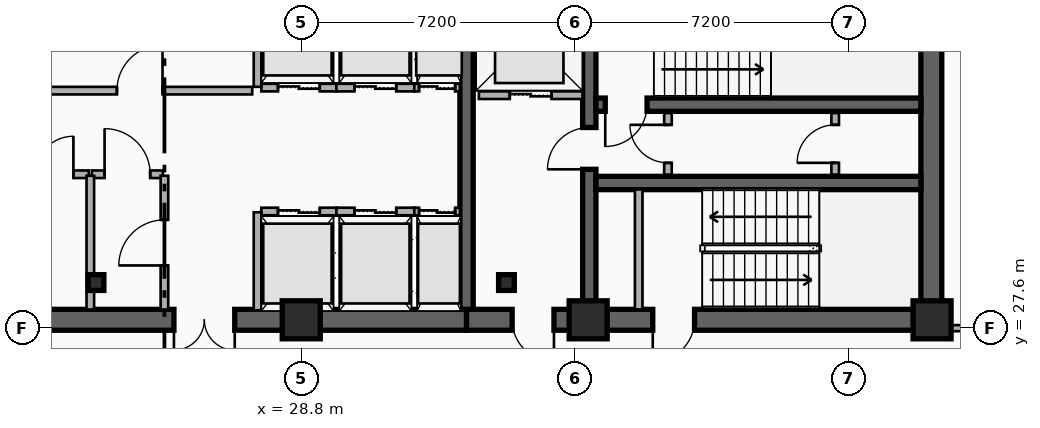
"""IFC4 building model, lengths in metres.
Left out: names, types, materials, properties, quantities, classifications, styles, units other than length and angle.
Written with IfcOpenShell. Run it as: python <this file> out.ifc"""

import sys

from ifc_helpers import new_model, si_unit, direction, frame, frame_2d, origin, origin_2d, place, context, subcontext, project, spatial, rectangle, i_section, extrude, element, fill, save


model = new_model("IFC4")
c1 = context("Model", 3, precision=1e-05, world=origin(), true_north=direction((0.0, 1.0)))
c2 = subcontext(c1, "Body", "Model", "MODEL_VIEW")
j1 = project(units=[si_unit("LENGTHUNIT", "METRE"), si_unit("PLANEANGLEUNIT", "RADIAN")], contexts=[c1])
p1 = place(None, origin())
s1 = spatial("IfcSite", under=j1, at=p1, CompositionType="ELEMENT")
p2 = place(p1, origin())
s2 = spatial("IfcBuilding", under=s1, at=p2, CompositionType="ELEMENT")
p3 = place(p2, frame((0.0, 0.0, 183.85)))
s3 = spatial("IfcBuildingStorey", under=s2, at=p3, CompositionType="ELEMENT", Elevation=183.85)
p4 = place(p3, frame((33.15, 27.82, 0.0), z_axis=(0.0, 0.0, 1.0), x_axis=(-1.0, 0.0, 0.0)))
e1 = element("IfcWall", 1, at=p4, inside=s3, PredefinedType="SHEAR", context=c2, shape_type="SweptSolid", body=[
    extrude(rectangle(XDim=11.97, YDim=0.55, at=frame_2d((5.985, 0.0))), origin(), (0.0, 0.0, 1.0), 4.55),
])
p5 = place(p4, frame((6.1, 0.0, 0.0)))
e2 = element("IfcOpeningElement", 2, at=p5, cuts=e1, PredefinedType="OPENING", context=c2, shape_type="SweptSolid", body=[
    extrude(rectangle(XDim=1.6, YDim=2.2, at=frame_2d((0.8, 1.1))), frame((0.0, 0.285, 0.0), z_axis=(0.0, -1.0, 0.0), x_axis=(1.0, 0.0, 0.0)), (0.0, 0.0, 1.0), 0.57),
])
p6 = place(p3, frame((45.38, 27.82, 0.0), z_axis=(0.0, 0.0, 1.0), x_axis=(-1.0, 0.0, 0.0)))
e3 = element("IfcWall", 3, at=p6, inside=s3, PredefinedType="SHEAR", context=c2, shape_type="SweptSolid", body=[
    extrude(rectangle(XDim=12.23, YDim=0.55, at=frame_2d((6.115, 0.0))), origin(), (0.0, 0.0, 1.0), 4.55),
])
p7 = place(p6, frame((9.93, 0.0, 0.0)))
e4 = element("IfcOpeningElement", 4, at=p7, cuts=e3, PredefinedType="OPENING", context=c2, shape_type="SweptSolid", body=[
    extrude(rectangle(XDim=1.1, YDim=2.15, at=frame_2d((0.55, 1.075))), frame((0.0, 0.285, 0.0), z_axis=(0.0, -1.0, 0.0), x_axis=(1.0, 0.0, 0.0)), (0.0, 0.0, 1.0), 0.57),
])
p8 = place(p6, frame((6.23, 0.0, 0.0)))
e5 = element("IfcOpeningElement", 5, at=p8, cuts=e3, PredefinedType="OPENING", context=c2, shape_type="SweptSolid", body=[
    extrude(rectangle(XDim=1.1, YDim=2.15, at=frame_2d((0.55, 1.075))), frame((0.0, 0.285, 0.0), z_axis=(0.0, -1.0, 0.0), x_axis=(1.0, 0.0, 0.0)), (0.0, 0.0, 1.0), 0.57),
])
p9 = place(p3, frame((45.38, 28.095, 0.0), z_axis=(0.0, 0.0, 1.0), x_axis=(0.0, 1.0, 0.0)))
e6 = element("IfcWall", 6, at=p9, inside=s3, PredefinedType="SHEAR", context=c2, shape_type="SweptSolid", body=[
    extrude(rectangle(XDim=8.68, YDim=0.55, at=frame_2d((4.34, 0.0))), origin(), (0.0, 0.0, 1.0), 4.55),
])
p10 = place(p3, frame((33.15, 28.095, 0.0), z_axis=(0.0, 0.0, 1.0), x_axis=(0.0, 1.0, 0.0)))
e7 = element("IfcWall", 7, at=p10, inside=s3, PredefinedType="SHEAR", context=c2, shape_type="SweptSolid", body=[
    extrude(rectangle(XDim=8.68, YDim=0.35, at=frame_2d((4.34, 0.0))), origin(), (0.0, 0.0, 1.0), 4.55),
])
p11 = place(p3, frame((36.38, 28.095, 0.0), z_axis=(0.0, 0.0, 1.0), x_axis=(0.0, 1.0, 0.0)))
e8 = element("IfcWall", 8, at=p11, inside=s3, PredefinedType="SHEAR", context=c2, shape_type="SweptSolid", body=[
    extrude(rectangle(XDim=8.68, YDim=0.35, at=frame_2d((4.34, 0.0))), origin(), (0.0, 0.0, 1.0), 4.55),
])
p12 = place(p11, frame((3.685, 0.0, 0.0)))
e9 = element("IfcOpeningElement", 9, at=p12, cuts=e8, PredefinedType="OPENING", context=c2, shape_type="SweptSolid", body=[
    extrude(rectangle(XDim=1.1, YDim=2.15, at=frame_2d((0.55, 1.075))), frame((0.0, 0.185, 0.0), z_axis=(0.0, -1.0, 0.0), x_axis=(1.0, 0.0, 0.0)), (0.0, 0.0, 1.0), 0.37),
])
p13 = place(p3, frame((45.105, 33.48, 0.0), z_axis=(0.0, 0.0, 1.0), x_axis=(-1.0, 0.0, 0.0)))
e10 = element("IfcWall", 10, at=p13, inside=s3, PredefinedType="SHEAR", context=c2, shape_type="SweptSolid", body=[
    extrude(rectangle(XDim=8.55, YDim=0.35, at=frame_2d((4.275, 0.0))), origin(), (0.0, 0.0, 1.0), 4.55),
])
p14 = place(p13, frame((7.205, 0.0, 0.0)))
e11 = element("IfcOpeningElement", 11, at=p14, cuts=e10, PredefinedType="OPENING", context=c2, shape_type="SweptSolid", body=[
    extrude(rectangle(XDim=1.1, YDim=2.15, at=frame_2d((0.55, 1.075))), frame((0.0, 0.185, 0.0), z_axis=(0.0, -1.0, 0.0), x_axis=(1.0, 0.0, 0.0)), (0.0, 0.0, 1.0), 0.37),
])
p15 = place(p3, frame((36.555, 31.42, 0.0), z_axis=(0.0, 0.0, 1.0), x_axis=(1.0, 0.0, 0.0)))
e12 = element("IfcWall", 12, at=p15, inside=s3, PredefinedType="SHEAR", context=c2, shape_type="SweptSolid", body=[
    extrude(rectangle(XDim=8.55, YDim=0.35, at=frame_2d((4.275, 0.0))), origin(), (0.0, 0.0, 1.0), 4.55),
])
for number, where, z_axis, x_axis in (
    (13, (23.4, 28.8, 0.0), (0.0, 0.0, 1.0), (1.0, 0.0, 0.0)),
    (14, (34.2, 28.8, 0.0), (0.0, 0.0, 1.0), (1.0, 0.0, 0.0)),
):
    element("IfcColumn", number, at=place(p3, frame(where, z_axis=z_axis, x_axis=x_axis)), inside=s3, PredefinedType="COLUMN", context=c2, shape_type="SweptSolid", body=[
        extrude(i_section(OverallWidth=0.413, OverallDepth=0.415, WebThickness=0.03, FlangeThickness=0.047, FilletRadius=0.015, at=origin_2d()), origin(), (0.0, 0.0, 1.0), 4.55),
    ])
for number, where, z_axis, x_axis in (
    (15, (28.8, 27.82, 0.0), (0.0, 0.0, 1.0), (1.0, 0.0, 0.0)),
    (16, (36.35, 27.82, 0.0), (0.0, 0.0, 1.0), (1.0, 0.0, 0.0)),
    (17, (45.4, 27.82, 0.0), (0.0, 0.0, 1.0), (1.0, 0.0, 0.0)),
):
    element("IfcColumn", number, at=place(p3, frame(where, z_axis=z_axis, x_axis=x_axis)), inside=s3, PredefinedType="COLUMN", context=c2, shape_type="SweptSolid", body=[
        extrude(rectangle(XDim=1.0, YDim=1.0, at=origin_2d()), origin(), (0.0, 0.0, 1.0), 4.55),
    ])
p16 = place(p3, frame((33.475, 33.73, 0.0), z_axis=(0.0, 0.0, 1.0), x_axis=(1.0, 0.0, 0.0)))
e18 = element("IfcWall", 18, at=p16, inside=s3, PredefinedType="PARTITIONING", context=c2, shape_type="SweptSolid", body=[
    extrude(rectangle(XDim=2.725, YDim=0.2, at=frame_2d((1.362, 0.0))), origin(), (0.0, 0.0, 1.0), 3.3),
])
p17 = place(p16, frame((0.812, 0.0, 0.0)))
e19 = element("IfcOpeningElement", 19, at=p17, cuts=e18, PredefinedType="OPENING", context=c2, shape_type="SweptSolid", body=[
    extrude(rectangle(XDim=1.1, YDim=2.15, at=frame_2d((0.55, 1.075))), frame((0.0, 0.11, 0.0), z_axis=(0.0, -1.0, 0.0), x_axis=(1.0, 0.0, 0.0)), (0.0, 0.0, 1.0), 0.22),
])
p18 = place(p3, frame((27.75, 30.67, 0.0), z_axis=(0.0, 0.0, 1.0), x_axis=(1.0, 0.0, 0.0)))
e20 = element("IfcWall", 20, at=p18, inside=s3, PredefinedType="PARTITIONING", context=c2, shape_type="SweptSolid", body=[
    extrude(rectangle(XDim=1.975, YDim=0.2, at=frame_2d((0.988, 0.0))), origin(), (0.0, 0.0, 1.0), 3.3),
])
p19 = place(p18, frame((0.438, 0.0, 0.0)))
e21 = element("IfcOpeningElement", 21, at=p19, cuts=e20, PredefinedType="OPENING", context=c2, shape_type="SweptSolid", body=[
    extrude(rectangle(XDim=1.1, YDim=2.15, at=frame_2d((0.55, 1.075))), frame((0.0, 0.11, 0.0), z_axis=(0.0, -1.0, 0.0), x_axis=(1.0, 0.0, 0.0)), (0.0, 0.0, 1.0), 0.22),
])
p20 = place(p3, frame((27.65, 28.07, 0.0), z_axis=(0.0, 0.0, 1.0), x_axis=(0.0, 1.0, 0.0)))
e22 = element("IfcWall", 22, at=p20, inside=s3, PredefinedType="PARTITIONING", context=c2, shape_type="SweptSolid", body=[
    extrude(rectangle(XDim=2.58, YDim=0.2, at=frame_2d((1.29, 0.0))), origin(), (0.0, 0.0, 1.0), 3.3),
])
p21 = place(p3, frame((29.725, 30.67, 0.0), z_axis=(0.0, 0.0, 1.0), x_axis=(1.0, 0.0, 0.0)))
e23 = element("IfcWall", 23, at=p21, inside=s3, PredefinedType="PARTITIONING", context=c2, shape_type="SweptSolid", body=[
    extrude(rectangle(XDim=2.05, YDim=0.2, at=frame_2d((1.025, 0.0))), origin(), (0.0, 0.0, 1.0), 3.61),
])
p22 = place(p21, frame((0.475, 0.0, 0.0)))
e24 = element("IfcOpeningElement", 24, at=p22, cuts=e23, PredefinedType="OPENING", context=c2, shape_type="SweptSolid", body=[
    extrude(rectangle(XDim=1.1, YDim=2.15, at=frame_2d((0.55, 1.075))), frame((0.0, 0.11, 0.0), z_axis=(0.0, -1.0, 0.0), x_axis=(1.0, 0.0, 0.0)), (0.0, 0.0, 1.0), 0.22),
])
p23 = place(p3, frame((31.775, 30.67, 0.0), z_axis=(0.0, 0.0, 1.0), x_axis=(1.0, 0.0, 0.0)))
e25 = element("IfcWall", 25, at=p23, inside=s3, PredefinedType="PARTITIONING", context=c2, shape_type="SweptSolid", body=[
    extrude(rectangle(XDim=1.2, YDim=0.2, at=frame_2d((0.6, 0.0))), origin(), (0.0, 0.0, 1.0), 3.61),
])
p24 = place(p23, frame((0.125, 0.0, 0.0)))
e26 = element("IfcOpeningElement", 26, at=p24, cuts=e25, PredefinedType="OPENING", context=c2, shape_type="SweptSolid", body=[
    extrude(rectangle(XDim=0.95, YDim=2.15, at=frame_2d((0.475, 1.075))), frame((0.0, 0.11, 0.0), z_axis=(0.0, -1.0, 0.0), x_axis=(1.0, 0.0, 0.0)), (0.0, 0.0, 1.0), 0.22),
])
p25 = place(p3, frame((27.75, 33.93, 0.0), z_axis=(0.0, 0.0, 1.0), x_axis=(1.0, 0.0, 0.0)))
e27 = element("IfcWall", 27, at=p25, inside=s3, PredefinedType="PARTITIONING", context=c2, shape_type="SweptSolid", body=[
    extrude(rectangle(XDim=1.975, YDim=0.2, at=frame_2d((0.988, 0.0))), origin(), (0.0, 0.0, 1.0), 3.3),
])
p26 = place(p25, frame((0.438, 0.0, 0.0)))
e28 = element("IfcOpeningElement", 28, at=p26, cuts=e27, PredefinedType="OPENING", context=c2, shape_type="SweptSolid", body=[
    extrude(rectangle(XDim=1.1, YDim=2.15, at=frame_2d((0.55, 1.075))), frame((0.0, 0.11, 0.0), z_axis=(0.0, -1.0, 0.0), x_axis=(1.0, 0.0, 0.0)), (0.0, 0.0, 1.0), 0.22),
])
p27 = place(p3, frame((27.65, 33.95, 0.0), z_axis=(0.0, 0.0, 1.0), x_axis=(0.0, 1.0, 0.0)))
e29 = element("IfcWall", 29, at=p27, inside=s3, PredefinedType="PARTITIONING", context=c2, shape_type="SweptSolid", body=[
    extrude(rectangle(XDim=2.68, YDim=0.2, at=frame_2d((1.34, 0.0))), origin(), (0.0, 0.0, 1.0), 3.3),
])
p28 = place(p3, frame((29.725, 33.93, 0.0), z_axis=(0.0, 0.0, 1.0), x_axis=(1.0, 0.0, 0.0)))
e30 = element("IfcWall", 30, at=p28, inside=s3, PredefinedType="PARTITIONING", context=c2, shape_type="SweptSolid", body=[
    extrude(rectangle(XDim=2.05, YDim=0.2, at=frame_2d((1.025, 0.0))), origin(), (0.0, 0.0, 1.0), 4.23),
])
p29 = place(p28, frame((0.475, 0.0, 0.0)))
e31 = element("IfcOpeningElement", 31, at=p29, cuts=e30, PredefinedType="OPENING", context=c2, shape_type="SweptSolid", body=[
    extrude(rectangle(XDim=1.1, YDim=2.15, at=frame_2d((0.55, 1.075))), frame((0.0, 0.11, 0.0), z_axis=(0.0, -1.0, 0.0), x_axis=(1.0, 0.0, 0.0)), (0.0, 0.0, 1.0), 0.22),
])
p30 = place(p3, frame((31.775, 33.93, 0.0), z_axis=(0.0, 0.0, 1.0), x_axis=(1.0, 0.0, 0.0)))
e32 = element("IfcWall", 32, at=p30, inside=s3, PredefinedType="PARTITIONING", context=c2, shape_type="SweptSolid", body=[
    extrude(rectangle(XDim=1.2, YDim=0.2, at=frame_2d((0.6, 0.0))), origin(), (0.0, 0.0, 1.0), 4.23),
])
p31 = place(p30, frame((0.125, 0.0, 0.0)))
e33 = element("IfcOpeningElement", 33, at=p31, cuts=e32, PredefinedType="OPENING", context=c2, shape_type="SweptSolid", body=[
    extrude(rectangle(XDim=0.95, YDim=2.15, at=frame_2d((0.475, 1.075))), frame((0.0, 0.11, 0.0), z_axis=(0.0, -1.0, 0.0), x_axis=(1.0, 0.0, 0.0)), (0.0, 0.0, 1.0), 0.22),
])
p32 = place(p3, frame((37.68, 28.095, 0.0), z_axis=(0.0, 0.0, 1.0), x_axis=(0.0, 1.0, 0.0)))
e34 = element("IfcWall", 34, at=p32, inside=s3, PredefinedType="PARTITIONING", context=c2, shape_type="SweptSolid", body=[
    extrude(rectangle(XDim=3.155, YDim=0.2, at=frame_2d((1.578, 0.0))), origin(), (0.0, 0.0, 1.0), 3.61),
])
p33 = place(p3, frame((38.45, 31.64, 0.0), z_axis=(0.0, 0.0, 1.0), x_axis=(0.0, 1.0, 0.0)))
e35 = element("IfcWall", 35, at=p33, inside=s3, PredefinedType="PARTITIONING", context=c2, shape_type="SweptSolid", body=[
    extrude(rectangle(XDim=1.62, YDim=0.2, at=frame_2d((0.81, 0.0))), origin(), (0.0, 0.0, 1.0), 4.23),
])
p34 = place(p33, frame((0.31, 0.0, 0.0)))
e36 = element("IfcOpeningElement", 36, at=p34, cuts=e35, PredefinedType="OPENING", context=c2, shape_type="SweptSolid", body=[
    extrude(rectangle(XDim=1.0, YDim=2.15, at=frame_2d((0.5, 1.075))), frame((0.0, 0.11, 0.0), z_axis=(0.0, -1.0, 0.0), x_axis=(1.0, 0.0, 0.0)), (0.0, 0.0, 1.0), 0.22),
])
p35 = place(p3, frame((42.85, 31.64, 0.0), z_axis=(0.0, 0.0, 1.0), x_axis=(0.0, 1.0, 0.0)))
e37 = element("IfcWall", 37, at=p35, inside=s3, PredefinedType="PARTITIONING", context=c2, shape_type="SweptSolid", body=[
    extrude(rectangle(XDim=1.62, YDim=0.2, at=frame_2d((0.81, 0.0))), origin(), (0.0, 0.0, 1.0), 4.23),
])
p36 = place(p35, frame((0.31, 0.0, 0.0)))
e38 = element("IfcOpeningElement", 38, at=p36, cuts=e37, PredefinedType="OPENING", context=c2, shape_type="SweptSolid", body=[
    extrude(rectangle(XDim=1.0, YDim=2.15, at=frame_2d((0.5, 1.075))), frame((0.0, 0.11, 0.0), z_axis=(0.0, -1.0, 0.0), x_axis=(1.0, 0.0, 0.0)), (0.0, 0.0, 1.0), 0.22),
])
p37 = place(p3, frame((21.4, 31.65, 0.0), z_axis=(0.0, 0.0, 1.0), x_axis=(1.0, 0.0, 0.0)))
e39 = element("IfcWall", 39, at=p37, inside=s3, PredefinedType="PARTITIONING", context=c2, shape_type="SweptSolid", body=[
    extrude(rectangle(XDim=1.81, YDim=0.2, at=frame_2d((0.905, 0.0))), origin(), (0.0, 0.0, 1.0), 3.3),
])
p38 = place(p37, frame((0.405, 0.0, 0.0)))
e40 = element("IfcOpeningElement", 40, at=p38, cuts=e39, PredefinedType="OPENING", context=c2, shape_type="SweptSolid", body=[
    extrude(rectangle(XDim=1.0, YDim=2.15, at=frame_2d((0.5, 1.075))), frame((0.0, 0.11, 0.0), z_axis=(0.0, -1.0, 0.0), x_axis=(1.0, 0.0, 0.0)), (0.0, 0.0, 1.0), 0.22),
])
p39 = place(p3, frame((23.29, 31.65, 0.0), z_axis=(0.0, 0.0, 1.0), x_axis=(1.0, 0.0, 0.0)))
e41 = element("IfcWall", 41, at=p39, inside=s3, PredefinedType="PARTITIONING", context=c2, shape_type="SweptSolid", body=[
    extrude(rectangle(XDim=1.87, YDim=0.2, at=frame_2d((0.935, 0.0))), origin(), (0.0, 0.0, 1.0), 4.23),
])
p40 = place(p39, frame((0.335, 0.0, 0.0)))
e42 = element("IfcOpeningElement", 42, at=p40, cuts=e41, PredefinedType="OPENING", context=c2, shape_type="SweptSolid", body=[
    extrude(rectangle(XDim=1.2, YDim=2.15, at=frame_2d((0.6, 1.075))), frame((0.0, 0.11, 0.0), z_axis=(0.0, -1.0, 0.0), x_axis=(1.0, 0.0, 0.0)), (0.0, 0.0, 1.0), 0.22),
])
p41 = place(p3, frame((21.59, 33.85, 0.0), z_axis=(0.0, 0.0, 1.0), x_axis=(1.0, 0.0, 0.0)))
e43 = element("IfcWall", 43, at=p41, inside=s3, PredefinedType="PARTITIONING", context=c2, shape_type="SweptSolid", body=[
    extrude(rectangle(XDim=5.92, YDim=0.2, at=frame_2d((2.96, 0.0))), origin(), (0.0, 0.0, 1.0), 3.3),
])
p42 = place(p41, frame((2.36, 0.0, 0.0)))
e44 = element("IfcOpeningElement", 44, at=p42, cuts=e43, PredefinedType="OPENING", context=c2, shape_type="SweptSolid", body=[
    extrude(rectangle(XDim=1.2, YDim=2.15, at=frame_2d((0.6, 1.075))), frame((0.0, 0.11, 0.0), z_axis=(0.0, -1.0, 0.0), x_axis=(1.0, 0.0, 0.0)), (0.0, 0.0, 1.0), 0.22),
])
p43 = place(p3, frame((25.2, 28.09, 0.0), z_axis=(0.0, 0.0, 1.0), x_axis=(0.0, 1.0, 0.0)))
e45 = element("IfcWall", 45, at=p43, inside=s3, PredefinedType="PARTITIONING", context=c2, shape_type="SweptSolid", body=[
    extrude(rectangle(XDim=3.52, YDim=0.2, at=frame_2d((1.76, 0.0))), origin(), (0.0, 0.0, 1.0), 3.61),
])
p44 = place(p43, frame((1.16, 0.0, 0.0)))
e46 = element("IfcOpeningElement", 46, at=p44, cuts=e45, PredefinedType="OPENING", context=c2, shape_type="SweptSolid", body=[
    extrude(rectangle(XDim=1.2, YDim=2.15, at=frame_2d((0.6, 1.075))), frame((0.0, 0.11, 0.0), z_axis=(0.0, -1.0, 0.0), x_axis=(1.0, 0.0, 0.0)), (0.0, 0.0, 1.0), 0.22),
])
p45 = place(p3, frame((23.25, 28.09, 0.0), z_axis=(0.0, 0.0, 1.0), x_axis=(0.0, 1.0, 0.0)))
e47 = element("IfcWall", 47, at=p45, inside=s3, PredefinedType="PARTITIONING", context=c2, shape_type="SweptSolid", body=[
    extrude(rectangle(XDim=3.52, YDim=0.2, at=frame_2d((1.76, 0.0))), origin(), (0.0, 0.0, 1.0), 3.61),
])
p46 = place(p3, frame((45.41, 27.6, 0.0), z_axis=(0.0, 0.0, 1.0), x_axis=(1.0, 0.0, 0.0)))
e48 = element("IfcWall", 48, at=p46, inside=s3, PredefinedType="PARTITIONING", context=c2, shape_type="SweptSolid", body=[
    extrude(rectangle(XDim=0.91, YDim=0.16, at=frame_2d((0.455, 0.0))), origin(), (0.0, 0.0, 1.0), 3.3),
])
p47 = place(p17, origin())
e49 = element("IfcDoor", 49, at=p47, inside=s3, OperationType="DOUBLE_DOOR_SLIDING", PredefinedType="DOOR", context=c2, shape_type="SweptSolid", body=[
    extrude(rectangle(XDim=1.1, YDim=2.15, at=frame_2d((0.55, 1.075))), frame((0.0, 0.025, 0.0), z_axis=(0.0, -1.0, 0.0), x_axis=(1.0, 0.0, 0.0)), (0.0, 0.0, 1.0), 0.05),
])
fill(e19, e49)
p48 = place(p19, origin())
e50 = element("IfcDoor", 50, at=p48, inside=s3, OperationType="DOUBLE_DOOR_SLIDING", PredefinedType="DOOR", context=c2, shape_type="SweptSolid", body=[
    extrude(rectangle(XDim=1.1, YDim=2.15, at=frame_2d((0.55, 1.075))), frame((0.0, 0.025, 0.0), z_axis=(0.0, -1.0, 0.0), x_axis=(1.0, 0.0, 0.0)), (0.0, 0.0, 1.0), 0.05),
])
fill(e21, e50)
p49 = place(p22, origin())
e51 = element("IfcDoor", 51, at=p49, inside=s3, OperationType="DOUBLE_DOOR_SLIDING", PredefinedType="DOOR", context=c2, shape_type="SweptSolid", body=[
    extrude(rectangle(XDim=1.1, YDim=2.15, at=frame_2d((0.55, 1.075))), frame((0.0, 0.025, 0.0), z_axis=(0.0, -1.0, 0.0), x_axis=(1.0, 0.0, 0.0)), (0.0, 0.0, 1.0), 0.05),
])
fill(e24, e51)
p50 = place(p24, origin())
e52 = element("IfcDoor", 52, at=p50, inside=s3, OperationType="DOUBLE_DOOR_SLIDING", PredefinedType="DOOR", context=c2, shape_type="SweptSolid", body=[
    extrude(rectangle(XDim=0.95, YDim=2.15, at=frame_2d((0.475, 1.075))), frame((0.0, 0.025, 0.0), z_axis=(0.0, -1.0, 0.0), x_axis=(1.0, 0.0, 0.0)), (0.0, 0.0, 1.0), 0.05),
])
fill(e26, e52)
p51 = place(p26, origin())
e53 = element("IfcDoor", 53, at=p51, inside=s3, OperationType="DOUBLE_DOOR_SLIDING", PredefinedType="DOOR", context=c2, shape_type="SweptSolid", body=[
    extrude(rectangle(XDim=1.1, YDim=2.15, at=frame_2d((0.55, 1.075))), frame((0.0, 0.025, 0.0), z_axis=(0.0, -1.0, 0.0), x_axis=(1.0, 0.0, 0.0)), (0.0, 0.0, 1.0), 0.05),
])
fill(e28, e53)
p52 = place(p29, origin())
e54 = element("IfcDoor", 54, at=p52, inside=s3, OperationType="DOUBLE_DOOR_SLIDING", PredefinedType="DOOR", context=c2, shape_type="SweptSolid", body=[
    extrude(rectangle(XDim=1.1, YDim=2.15, at=frame_2d((0.55, 1.075))), frame((0.0, 0.025, 0.0), z_axis=(0.0, -1.0, 0.0), x_axis=(1.0, 0.0, 0.0)), (0.0, 0.0, 1.0), 0.05),
])
fill(e31, e54)
p53 = place(p31, origin())
e55 = element("IfcDoor", 55, at=p53, inside=s3, OperationType="DOUBLE_DOOR_SLIDING", PredefinedType="DOOR", context=c2, shape_type="SweptSolid", body=[
    extrude(rectangle(XDim=0.95, YDim=2.15, at=frame_2d((0.475, 1.075))), frame((0.0, 0.025, 0.0), z_axis=(0.0, -1.0, 0.0), x_axis=(1.0, 0.0, 0.0)), (0.0, 0.0, 1.0), 0.05),
])
fill(e33, e55)
p54 = place(p14, origin())
e56 = element("IfcDoor", 56, at=p54, inside=s3, OperationType="SINGLE_SWING_RIGHT", PredefinedType="DOOR", context=c2, shape_type="SweptSolid", body=[
    extrude(rectangle(XDim=1.1, YDim=2.15, at=frame_2d((0.55, 1.075))), frame((0.0, 0.025, 0.0), z_axis=(0.0, -1.0, 0.0), x_axis=(1.0, 0.0, 0.0)), (0.0, 0.0, 1.0), 0.05),
])
fill(e11, e56)
p55 = place(p12, origin())
e57 = element("IfcDoor", 57, at=p55, inside=s3, OperationType="SINGLE_SWING_LEFT", PredefinedType="DOOR", context=c2, shape_type="SweptSolid", body=[
    extrude(rectangle(XDim=1.1, YDim=2.15, at=frame_2d((0.55, 1.075))), frame((0.0, 0.025, 0.0), z_axis=(0.0, -1.0, 0.0), x_axis=(1.0, 0.0, 0.0)), (0.0, 0.0, 1.0), 0.05),
])
fill(e9, e57)
p56 = place(p7, origin())
e58 = element("IfcDoor", 58, at=p56, inside=s3, OperationType="SINGLE_SWING_LEFT", PredefinedType="DOOR", context=c2, shape_type="SweptSolid", body=[
    extrude(rectangle(XDim=1.1, YDim=2.15, at=frame_2d((0.55, 1.075))), frame((0.0, 0.025, 0.0), z_axis=(0.0, -1.0, 0.0), x_axis=(1.0, 0.0, 0.0)), (0.0, 0.0, 1.0), 0.05),
])
fill(e4, e58)
p57 = place(p8, origin())
e59 = element("IfcDoor", 59, at=p57, inside=s3, OperationType="SINGLE_SWING_RIGHT", PredefinedType="DOOR", context=c2, shape_type="SweptSolid", body=[
    extrude(rectangle(XDim=1.1, YDim=2.15, at=frame_2d((0.55, 1.075))), frame((0.0, 0.025, 0.0), z_axis=(0.0, -1.0, 0.0), x_axis=(1.0, 0.0, 0.0)), (0.0, 0.0, 1.0), 0.05),
])
fill(e5, e59)
p58 = place(p5, origin())
e60 = element("IfcDoor", 60, at=p58, inside=s3, OperationType="SINGLE_SWING_LEFT", PredefinedType="DOOR", context=c2, shape_type="SweptSolid", body=[
    extrude(rectangle(XDim=1.6, YDim=2.2, at=frame_2d((0.8, 1.1))), frame((0.0, 0.025, 0.0), z_axis=(0.0, -1.0, 0.0), x_axis=(1.0, 0.0, 0.0)), (0.0, 0.0, 1.0), 0.05),
])
fill(e2, e60)
p59 = place(p34, origin())
e61 = element("IfcDoor", 61, at=p59, inside=s3, OperationType="SINGLE_SWING_RIGHT", PredefinedType="DOOR", context=c2, shape_type="SweptSolid", body=[
    extrude(rectangle(XDim=1.0, YDim=2.15, at=frame_2d((0.5, 1.075))), frame((0.0, 0.025, 0.0), z_axis=(0.0, -1.0, 0.0), x_axis=(1.0, 0.0, 0.0)), (0.0, 0.0, 1.0), 0.05),
])
fill(e36, e61)
p60 = place(p36, origin())
e62 = element("IfcDoor", 62, at=p60, inside=s3, OperationType="SINGLE_SWING_LEFT", PredefinedType="DOOR", context=c2, shape_type="SweptSolid", body=[
    extrude(rectangle(XDim=1.0, YDim=2.15, at=frame_2d((0.5, 1.075))), frame((0.0, 0.025, 0.0), z_axis=(0.0, -1.0, 0.0), x_axis=(1.0, 0.0, 0.0)), (0.0, 0.0, 1.0), 0.05),
])
fill(e38, e62)
p61 = place(p38, origin())
e63 = element("IfcDoor", 63, at=p61, inside=s3, OperationType="SINGLE_SWING_RIGHT", PredefinedType="DOOR", context=c2, shape_type="SweptSolid", body=[
    extrude(rectangle(XDim=1.0, YDim=2.15, at=frame_2d((0.5, 1.075))), frame((0.0, 0.025, 0.0), z_axis=(0.0, -1.0, 0.0), x_axis=(1.0, 0.0, 0.0)), (0.0, 0.0, 1.0), 0.05),
])
fill(e40, e63)
p62 = place(p40, origin())
e64 = element("IfcDoor", 64, at=p62, inside=s3, OperationType="SINGLE_SWING_LEFT", PredefinedType="DOOR", context=c2, shape_type="SweptSolid", body=[
    extrude(rectangle(XDim=1.2, YDim=2.15, at=frame_2d((0.6, 1.075))), frame((0.0, 0.025, 0.0), z_axis=(0.0, -1.0, 0.0), x_axis=(1.0, 0.0, 0.0)), (0.0, 0.0, 1.0), 0.05),
])
fill(e42, e64)
p63 = place(p42, origin())
e65 = element("IfcDoor", 65, at=p63, inside=s3, OperationType="SINGLE_SWING_RIGHT", PredefinedType="DOOR", context=c2, shape_type="SweptSolid", body=[
    extrude(rectangle(XDim=1.2, YDim=2.15, at=frame_2d((0.6, 1.075))), frame((0.0, 0.025, 0.0), z_axis=(0.0, -1.0, 0.0), x_axis=(1.0, 0.0, 0.0)), (0.0, 0.0, 1.0), 0.05),
])
fill(e44, e65)
p64 = place(p44, origin())
e66 = element("IfcDoor", 66, at=p64, inside=s3, OperationType="SINGLE_SWING_LEFT", PredefinedType="DOOR", context=c2, shape_type="SweptSolid", body=[
    extrude(rectangle(XDim=1.2, YDim=2.15, at=frame_2d((0.6, 1.075))), frame((0.0, 0.025, 0.0), z_axis=(0.0, -1.0, 0.0), x_axis=(1.0, 0.0, 0.0)), (0.0, 0.0, 1.0), 0.05),
])
fill(e46, e66)
save(model, sys.argv[1])
